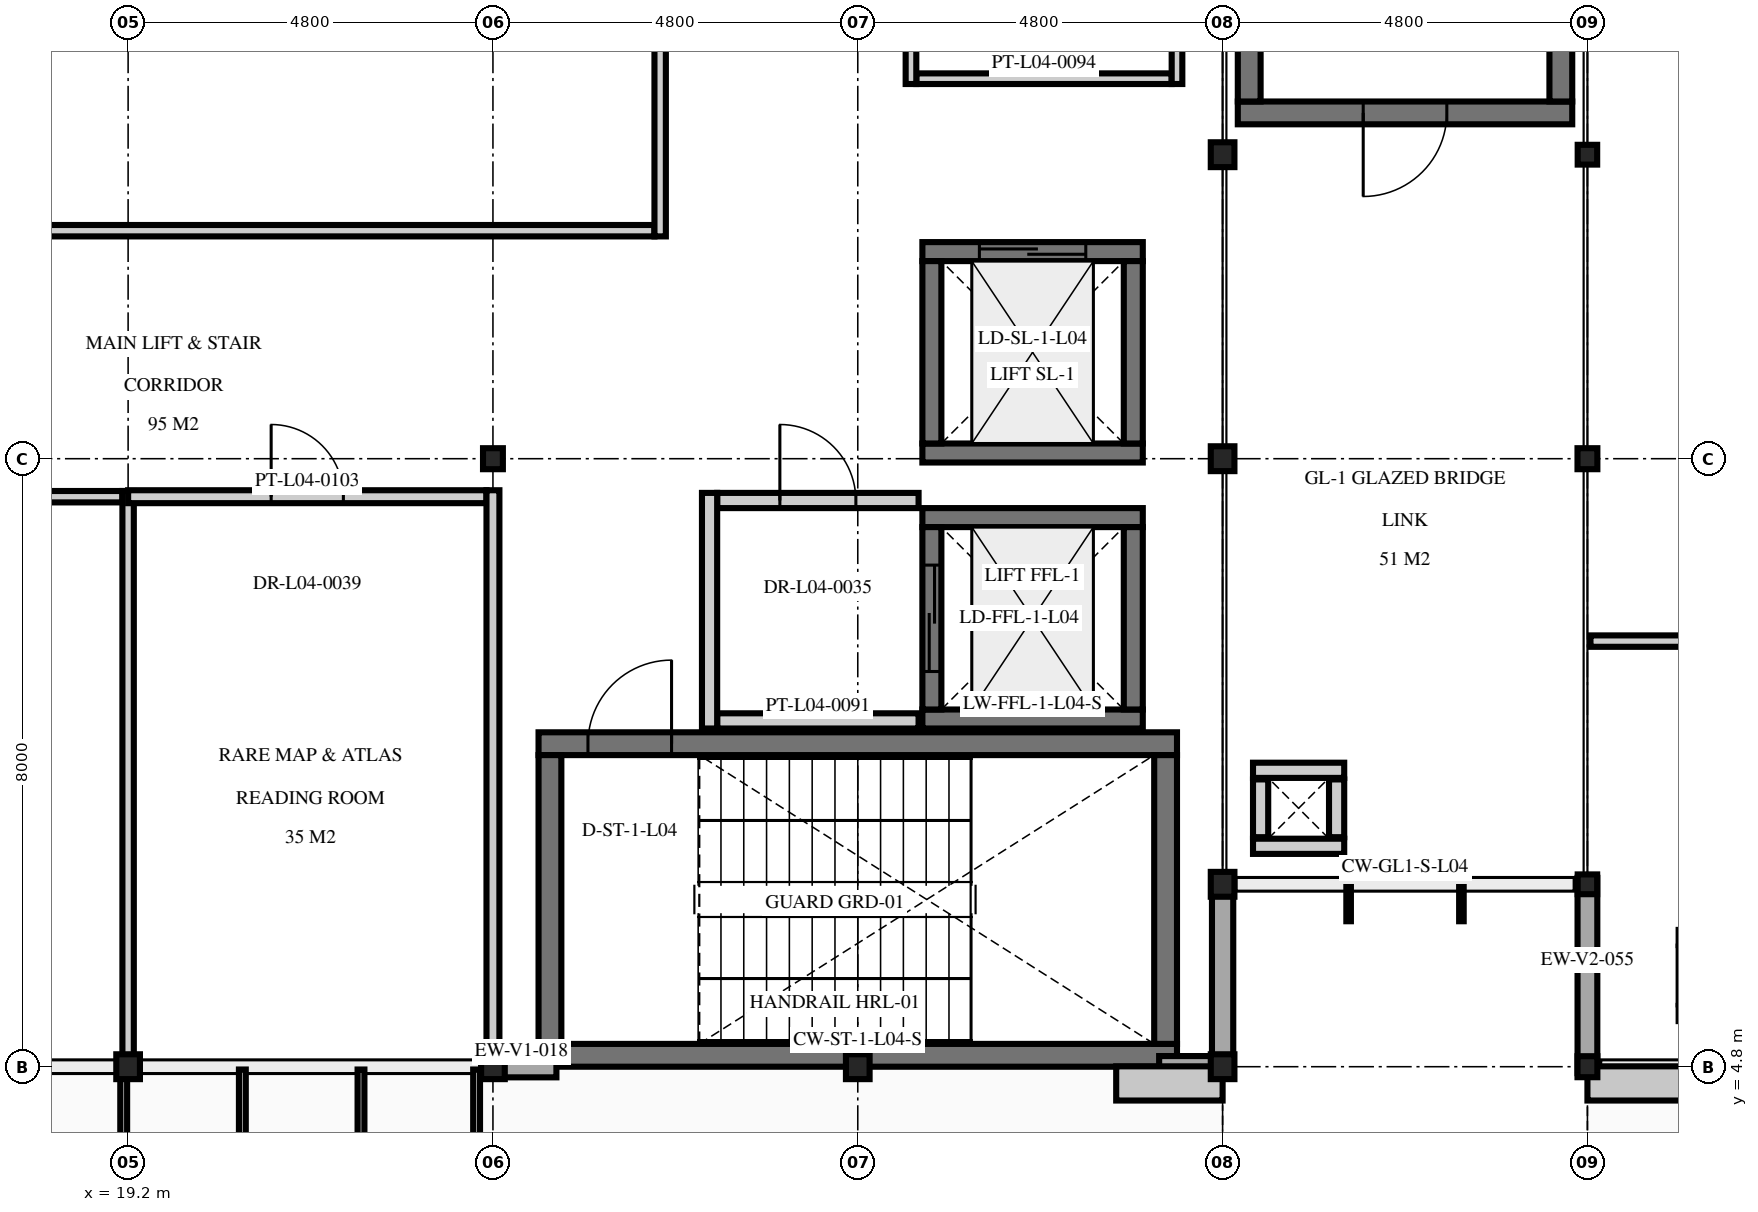
"""IFC4 building model, lengths in metres.
Left out: names, types, materials, properties, quantities, classifications, styles, units other than length and angle.
Written with IfcOpenShell. Run it as: python <this file> out.ifc"""

import sys

from ifc_helpers import new_model, si_unit, direction, frame, frame_2d, origin, origin_2d, place, context, subcontext, project, spatial, rectangle, i_section, extrude, element, fill, save


model = new_model("IFC4")
c1 = context("Model", 3, precision=1e-05, world=origin(), true_north=direction((0.0, 1.0)))
c2 = subcontext(c1, "Body", "Model", "MODEL_VIEW")
j1 = project(units=[si_unit("LENGTHUNIT", "METRE"), si_unit("PLANEANGLEUNIT", "RADIAN")], contexts=[c1])
p1 = place(None, origin())
s1 = spatial("IfcSite", under=j1, at=p1, CompositionType="ELEMENT")
p2 = place(p1, origin())
s2 = spatial("IfcBuilding", under=s1, at=p2, CompositionType="ELEMENT")
p3 = place(p2, frame((0.0, 0.0, 18.6)))
s3 = spatial("IfcBuildingStorey", under=s2, at=p3, CompositionType="ELEMENT", Elevation=18.6)
for number, where, z_axis, x_axis in (
    (1, (19.2, 4.8, 0.0), (0.0, 0.0, 1.0), (1.0, 0.0, 0.0)),
    (2, (24.0, 4.8, 0.0), (0.0, 0.0, 1.0), (1.0, 0.0, 0.0)),
    (3, (28.8, 4.8, 0.0), (0.0, 0.0, 1.0), (1.0, 0.0, 0.0)),
    (4, (33.6, 4.8, 0.0), (0.0, 0.0, 1.0), (1.0, 0.0, 0.0)),
    (5, (33.6, 7.2, 0.0), (0.0, 0.0, 1.0), (1.0, 0.0, 0.0)),
    (6, (33.6, 12.8, 0.0), (0.0, 0.0, 1.0), (1.0, 0.0, 0.0)),
    (7, (33.6, 16.8, 0.0), (0.0, 0.0, 1.0), (1.0, 0.0, 0.0)),
):
    element("IfcColumn", number, at=place(p3, frame(where, z_axis=z_axis, x_axis=x_axis)), inside=s3, PredefinedType="COLUMN", context=c2, shape_type="SweptSolid", body=[
        extrude(i_section(OverallWidth=0.311, OverallDepth=0.327, WebThickness=0.016, FlangeThickness=0.025, at=origin_2d()), origin(), (0.0, 0.0, 1.0), 4.5),
    ])
for number, where, z_axis, x_axis in (
    (8, (24.0, 12.8, 0.0), (0.0, 0.0, 1.0), (1.0, 0.0, 0.0)),
    (9, (38.4, 4.8, 0.0), (0.0, 0.0, 1.0), (1.0, 0.0, 0.0)),
    (10, (38.4, 12.8, 0.0), (0.0, 0.0, 1.0), (1.0, 0.0, 0.0)),
):
    element("IfcColumn", number, at=place(p3, frame(where, z_axis=z_axis, x_axis=x_axis)), inside=s3, PredefinedType="COLUMN", context=c2, shape_type="SweptSolid", body=[
        extrude(i_section(OverallWidth=0.261, OverallDepth=0.276, WebThickness=0.015, FlangeThickness=0.025, at=origin_2d()), origin(), (0.0, 0.0, 1.0), 4.5),
    ])
for number, where, z_axis, x_axis in (
    (11, (38.4, 7.2, 0.0), (0.0, 0.0, 1.0), (1.0, 0.0, 0.0)),
    (12, (38.4, 16.8, 0.0), (0.0, 0.0, 1.0), (1.0, 0.0, 0.0)),
):
    element("IfcColumn", number, at=place(p3, frame(where, z_axis=z_axis, x_axis=x_axis)), inside=s3, PredefinedType="COLUMN", context=c2, shape_type="SweptSolid", body=[
        extrude(i_section(OverallWidth=0.256, OverallDepth=0.26, WebThickness=0.01, FlangeThickness=0.017, at=origin_2d()), origin(), (0.0, 0.0, 1.0), 4.5),
    ])
p4 = place(p3, frame((33.0, 4.95, 0.0), z_axis=(0.0, 0.0, 1.0), x_axis=(-1.0, 0.0, 0.0)))
e13 = element("IfcWall", 13, at=p4, inside=s3, PredefinedType="SHEAR", context=c2, shape_type="SweptSolid", body=[
    extrude(rectangle(XDim=8.4, YDim=0.3, at=frame_2d((4.2, 0.0))), origin(), (0.0, 0.0, 1.0), 4.28),
])
p5 = place(p3, frame((24.6, 9.05, 0.0), z_axis=(0.0, 0.0, 1.0), x_axis=(1.0, 0.0, 0.0)))
e14 = element("IfcWall", 14, at=p5, inside=s3, PredefinedType="SHEAR", context=c2, shape_type="SweptSolid", body=[
    extrude(rectangle(XDim=8.4, YDim=0.3, at=frame_2d((4.2, 0.0))), origin(), (0.0, 0.0, 1.0), 4.28),
])
p6 = place(p5, frame((0.65, 0.0, 0.0)))
e15 = element("IfcOpeningElement", 15, at=p6, cuts=e14, PredefinedType="OPENING", context=c2, shape_type="SweptSolid", body=[
    extrude(rectangle(XDim=1.1, YDim=2.2, at=frame_2d((0.55, 1.1))), frame((0.0, 0.16, 0.0), z_axis=(0.0, -1.0, 0.0), x_axis=(1.0, 0.0, 0.0)), (0.0, 0.0, 1.0), 0.32),
])
for number, where, z_axis, x_axis in (
    (16, (24.75, 5.1, 0.0), (0.0, 0.0, 1.0), (0.0, 1.0, 0.0)),
    (17, (32.85, 8.9, 0.0), (0.0, 0.0, 1.0), (0.0, -1.0, 0.0)),
):
    element("IfcWall", number, at=place(p3, frame(where, z_axis=z_axis, x_axis=x_axis)), inside=s3, PredefinedType="SHEAR", context=c2, shape_type="SweptSolid", body=[
        extrude(rectangle(XDim=3.8, YDim=0.3, at=frame_2d((1.9, 0.0))), origin(), (0.0, 0.0, 1.0), 4.28),
    ])
p7 = place(p3, frame((38.2, 17.35, 0.0), z_axis=(0.0, 0.0, 1.0), x_axis=(-1.0, 0.0, 0.0)))
e18 = element("IfcWall", 18, at=p7, inside=s3, PredefinedType="SHEAR", context=c2, shape_type="SweptSolid", body=[
    extrude(rectangle(XDim=4.4, YDim=0.3, at=frame_2d((2.2, 0.0))), origin(), (0.0, 0.0, 1.0), 4.28),
])
p8 = place(p7, frame((1.65, 0.0, 0.0)))
e19 = element("IfcOpeningElement", 19, at=p8, cuts=e18, PredefinedType="OPENING", context=c2, shape_type="SweptSolid", body=[
    extrude(rectangle(XDim=1.1, YDim=2.2, at=frame_2d((0.55, 1.1))), frame((0.0, 0.16, 0.0), z_axis=(0.0, -1.0, 0.0), x_axis=(1.0, 0.0, 0.0)), (0.0, 0.0, 1.0), 0.32),
])
for number, where, z_axis, x_axis in (
    (20, (33.95, 17.5, 0.0), (0.0, 0.0, 1.0), (0.0, 1.0, 0.0)),
    (21, (38.05, 25.3, 0.0), (0.0, 0.0, 1.0), (0.0, -1.0, 0.0)),
):
    element("IfcWall", number, at=place(p3, frame(where, z_axis=z_axis, x_axis=x_axis)), inside=s3, PredefinedType="SHEAR", context=c2, shape_type="SweptSolid", body=[
        extrude(rectangle(XDim=7.8, YDim=0.3, at=frame_2d((3.9, 0.0))), origin(), (0.0, 0.0, 1.0), 4.28),
    ])
for number, where, z_axis, x_axis in (
    (22, (32.55, 9.375, 0.0), (0.0, 0.0, 1.0), (-1.0, 0.0, 0.0)),
    (23, (29.65, 12.025, 0.0), (0.0, 0.0, 1.0), (1.0, 0.0, 0.0)),
):
    element("IfcWall", number, at=place(p3, frame(where, z_axis=z_axis, x_axis=x_axis)), inside=s3, PredefinedType="SHEAR", context=c2, shape_type="SweptSolid", body=[
        extrude(rectangle(XDim=2.9, YDim=0.25, at=frame_2d((1.45, 0.0))), origin(), (0.0, 0.0, 1.0), 4.28),
    ])
p9 = place(p3, frame((29.775, 9.5, 0.0), z_axis=(0.0, 0.0, 1.0), x_axis=(0.0, 1.0, 0.0)))
e24 = element("IfcWall", 24, at=p9, inside=s3, PredefinedType="SHEAR", context=c2, shape_type="SweptSolid", body=[
    extrude(rectangle(XDim=2.4, YDim=0.25, at=frame_2d((1.2, 0.0))), origin(), (0.0, 0.0, 1.0), 4.28),
])
p10 = place(p9, frame((0.5, 0.0, 0.0)))
e25 = element("IfcOpeningElement", 25, at=p10, cuts=e24, PredefinedType="OPENING", context=c2, shape_type="SweptSolid", body=[
    extrude(rectangle(XDim=1.4, YDim=2.2, at=frame_2d((0.7, 1.1))), frame((0.0, 0.135, 0.0), z_axis=(0.0, -1.0, 0.0), x_axis=(1.0, 0.0, 0.0)), (0.0, 0.0, 1.0), 0.27),
])
p11 = place(p3, frame((32.425, 11.9, 0.0), z_axis=(0.0, 0.0, 1.0), x_axis=(0.0, -1.0, 0.0)))
e26 = element("IfcWall", 26, at=p11, inside=s3, PredefinedType="SHEAR", context=c2, shape_type="SweptSolid", body=[
    extrude(rectangle(XDim=2.4, YDim=0.25, at=frame_2d((1.2, 0.0))), origin(), (0.0, 0.0, 1.0), 4.28),
])
p12 = place(p3, frame((32.55, 12.875, 0.0), z_axis=(0.0, 0.0, 1.0), x_axis=(-1.0, 0.0, 0.0)))
e27 = element("IfcWall", 27, at=p12, inside=s3, PredefinedType="SHEAR", context=c2, shape_type="SweptSolid", body=[
    extrude(rectangle(XDim=2.9, YDim=0.25, at=frame_2d((1.45, 0.0))), origin(), (0.0, 0.0, 1.0), 4.28),
])
p13 = place(p3, frame((29.65, 15.525, 0.0), z_axis=(0.0, 0.0, 1.0), x_axis=(1.0, 0.0, 0.0)))
e28 = element("IfcWall", 28, at=p13, inside=s3, PredefinedType="SHEAR", context=c2, shape_type="SweptSolid", body=[
    extrude(rectangle(XDim=2.9, YDim=0.25, at=frame_2d((1.45, 0.0))), origin(), (0.0, 0.0, 1.0), 4.28),
])
p14 = place(p13, frame((0.75, 0.0, 0.0)))
e29 = element("IfcOpeningElement", 29, at=p14, cuts=e28, PredefinedType="OPENING", context=c2, shape_type="SweptSolid", body=[
    extrude(rectangle(XDim=1.4, YDim=2.2, at=frame_2d((0.7, 1.1))), frame((0.0, 0.135, 0.0), z_axis=(0.0, -1.0, 0.0), x_axis=(1.0, 0.0, 0.0)), (0.0, 0.0, 1.0), 0.27),
])
for number, where, z_axis, x_axis in (
    (30, (29.775, 13.0, 0.0), (0.0, 0.0, 1.0), (0.0, 1.0, 0.0)),
    (31, (32.425, 15.4, 0.0), (0.0, 0.0, 1.0), (0.0, -1.0, 0.0)),
):
    element("IfcWall", number, at=place(p3, frame(where, z_axis=z_axis, x_axis=x_axis)), inside=s3, PredefinedType="SHEAR", context=c2, shape_type="SweptSolid", body=[
        extrude(rectangle(XDim=2.4, YDim=0.25, at=frame_2d((1.2, 0.0))), origin(), (0.0, 0.0, 1.0), 4.28),
    ])
p15 = place(p3, frame((40.8, 5.5, 0.0), z_axis=(0.0, 0.0, 1.0), x_axis=(-1.0, 0.0, 0.0)))
e32 = element("IfcWall", 32, at=p15, inside=s3, PredefinedType="PARTITIONING", context=c2, shape_type="SweptSolid", body=[
    extrude(rectangle(XDim=1.2, YDim=0.2, at=frame_2d((0.6, 0.0))), origin(), (0.0, 0.0, 1.0), 3.78),
])
p16 = place(p3, frame((39.7, 5.62, 0.0), z_axis=(0.0, 0.0, 1.0), x_axis=(0.0, 1.0, 0.0)))
e33 = element("IfcWall", 33, at=p16, inside=s3, PredefinedType="PARTITIONING", context=c2, shape_type="SweptSolid", body=[
    extrude(rectangle(XDim=0.76, YDim=0.2, at=frame_2d((0.38, 0.0))), origin(), (0.0, 0.0, 1.0), 3.78),
])
for number, where, z_axis, x_axis in (
    (34, (35.2, 7.7, 0.0), (0.0, 0.0, 1.0), (-1.0, 0.0, 0.0)),
    (35, (34.0, 8.7, 0.0), (0.0, 0.0, 1.0), (1.0, 0.0, 0.0)),
):
    element("IfcWall", number, at=place(p3, frame(where, z_axis=z_axis, x_axis=x_axis)), inside=s3, PredefinedType="PARTITIONING", context=c2, shape_type="SweptSolid", body=[
        extrude(rectangle(XDim=1.2, YDim=0.2, at=frame_2d((0.6, 0.0))), origin(), (0.0, 0.0, 1.0), 3.78),
    ])
for number, where, z_axis, x_axis in (
    (36, (34.1, 7.82, 0.0), (0.0, 0.0, 1.0), (0.0, 1.0, 0.0)),
    (37, (35.1, 8.58, 0.0), (0.0, 0.0, 1.0), (0.0, -1.0, 0.0)),
):
    element("IfcWall", number, at=place(p3, frame(where, z_axis=z_axis, x_axis=x_axis)), inside=s3, PredefinedType="PARTITIONING", context=c2, shape_type="SweptSolid", body=[
        extrude(rectangle(XDim=0.76, YDim=0.2, at=frame_2d((0.38, 0.0))), origin(), (0.0, 0.0, 1.0), 3.78),
    ])
p17 = place(p3, frame((24.835, 4.8, 0.0), z_axis=(0.0, 0.0, 1.0), x_axis=(-1.0, 0.0, 0.0)))
e38 = element("IfcWall", 38, at=p17, inside=s3, PredefinedType="SOLIDWALL", context=c2, shape_type="SweptSolid", body=[
    extrude(rectangle(XDim=0.92, YDim=0.28, at=frame_2d((0.46, 0.0))), origin(), (0.0, 0.0, 1.0), 3.665),
])
p18 = place(p3, frame((33.685, 4.8, 0.0), z_axis=(0.0, 0.0, 1.0), x_axis=(-1.0, 0.0, 0.0)))
e39 = element("IfcWall", 39, at=p18, inside=s3, PredefinedType="SOLIDWALL", context=c2, shape_type="SweptSolid", body=[
    extrude(rectangle(XDim=0.92, YDim=0.28, at=frame_2d((0.46, 0.0))), origin(), (0.0, 0.0, 1.0), 3.665),
])
p19 = place(p3, frame((33.6, 7.285, 0.0), z_axis=(0.0, 0.0, 1.0), x_axis=(0.0, -1.0, 0.0)))
e40 = element("IfcWall", 40, at=p19, inside=s3, PredefinedType="SOLIDWALL", context=c2, shape_type="SweptSolid", body=[
    extrude(rectangle(XDim=2.57, YDim=0.28, at=frame_2d((1.285, 0.0))), origin(), (0.0, 0.0, 1.0), 3.665),
])
p20 = place(p3, frame((38.4, 4.715, 0.0), z_axis=(0.0, 0.0, 1.0), x_axis=(0.0, 1.0, 0.0)))
e41 = element("IfcWall", 41, at=p20, inside=s3, PredefinedType="SOLIDWALL", context=c2, shape_type="SweptSolid", body=[
    extrude(rectangle(XDim=2.57, YDim=0.26, at=frame_2d((1.285, 0.0))), origin(), (0.0, 0.0, 1.0), 3.855),
])
p21 = place(p3, frame((26.95, 9.35, 0.0), z_axis=(0.0, 0.0, 1.0), x_axis=(1.0, 0.0, 0.0)))
e42 = element("IfcWall", 42, at=p21, inside=s3, PredefinedType="PARTITIONING", context=c2, shape_type="SweptSolid", body=[
    extrude(rectangle(XDim=2.65, YDim=0.2, at=frame_2d((1.325, 0.0))), origin(), (0.0, 0.0, 1.0), 4.28),
])
p22 = place(p3, frame((26.95, 12.25, 0.0), z_axis=(0.0, 0.0, 1.0), x_axis=(1.0, 0.0, 0.0)))
e43 = element("IfcWall", 43, at=p22, inside=s3, PredefinedType="PARTITIONING", context=c2, shape_type="SweptSolid", body=[
    extrude(rectangle(XDim=2.65, YDim=0.2, at=frame_2d((1.325, 0.0))), origin(), (0.0, 0.0, 1.0), 4.28),
])
p23 = place(p22, frame((0.825, 0.0, 0.0)))
e44 = element("IfcOpeningElement", 44, at=p23, cuts=e43, PredefinedType="OPENING", context=c2, shape_type="SweptSolid", body=[
    extrude(rectangle(XDim=1.0, YDim=2.2, at=frame_2d((0.5, 1.1))), frame((0.0, 0.11, 0.0), z_axis=(0.0, -1.0, 0.0), x_axis=(1.0, 0.0, 0.0)), (0.0, 0.0, 1.0), 0.22),
])
p24 = place(p3, frame((26.85, 9.25, 0.0), z_axis=(0.0, 0.0, 1.0), x_axis=(0.0, 1.0, 0.0)))
e45 = element("IfcWall", 45, at=p24, inside=s3, PredefinedType="PARTITIONING", context=c2, shape_type="SweptSolid", body=[
    extrude(rectangle(XDim=3.1, YDim=0.2, at=frame_2d((1.55, 0.0))), origin(), (0.0, 0.0, 1.0), 4.28),
])
p25 = place(p3, frame((29.57, 17.8, 0.0), z_axis=(0.0, 0.0, 1.0), x_axis=(1.0, 0.0, 0.0)))
e46 = element("IfcWall", 46, at=p25, inside=s3, PredefinedType="PARTITIONING", context=c2, shape_type="SweptSolid", body=[
    extrude(rectangle(XDim=3.36, YDim=0.14, at=frame_2d((1.68, 0.0))), origin(), (0.0, 0.0, 1.0), 4.015),
])
p26 = place(p3, frame((29.5, 17.73, 0.0), z_axis=(0.0, 0.0, 1.0), x_axis=(0.0, 1.0, 0.0)))
e47 = element("IfcWall", 47, at=p26, inside=s3, PredefinedType="PARTITIONING", context=c2, shape_type="SweptSolid", body=[
    extrude(rectangle(XDim=4.24, YDim=0.14, at=frame_2d((2.12, 0.0))), origin(), (0.0, 0.0, 1.0), 3.665),
])
p27 = place(p26, frame((1.645, 0.0, 0.0)))
e48 = element("IfcOpeningElement", 48, at=p27, cuts=e47, PredefinedType="OPENING", context=c2, shape_type="SweptSolid", body=[
    extrude(rectangle(XDim=0.95, YDim=2.1, at=frame_2d((0.475, 1.05))), frame((0.0, 0.08, 0.0), z_axis=(0.0, -1.0, 0.0), x_axis=(1.0, 0.0, 0.0)), (0.0, 0.0, 1.0), 0.16),
])
p28 = place(p3, frame((33.0, 17.73, 0.0), z_axis=(0.0, 0.0, 1.0), x_axis=(0.0, 1.0, 0.0)))
e49 = element("IfcWall", 49, at=p28, inside=s3, PredefinedType="PARTITIONING", context=c2, shape_type="SweptSolid", body=[
    extrude(rectangle(XDim=4.24, YDim=0.14, at=frame_2d((2.12, 0.0))), origin(), (0.0, 0.0, 1.0), 3.665),
])
p29 = place(p3, frame((0.04, 12.3, 0.0), z_axis=(0.0, 0.0, 1.0), x_axis=(1.0, 0.0, 0.0)))
e50 = element("IfcWall", 50, at=p29, inside=s3, PredefinedType="PARTITIONING", context=c2, shape_type="SweptSolid", body=[
    extrude(rectangle(XDim=19.085, YDim=0.15, at=frame_2d((9.542, 0.0))), origin(), (0.0, 0.0, 1.0), 3.711),
])
p30 = place(p29, frame((10.818, 0.0, 0.0)))
e51 = element("IfcOpeningElement", 51, at=p30, cuts=e50, PredefinedType="OPENING", context=c2, shape_type="SweptSolid", body=[
    extrude(rectangle(XDim=0.95, YDim=2.15, at=frame_2d((0.475, 1.075))), frame((0.0, 0.085, 0.0), z_axis=(0.0, -1.0, 0.0), x_axis=(1.0, 0.0, 0.0)), (0.0, 0.0, 1.0), 0.17),
])
p31 = place(p3, frame((19.2, 4.84, 0.0), z_axis=(0.0, 0.0, 1.0), x_axis=(0.0, 1.0, 0.0)))
e52 = element("IfcWall", 52, at=p31, inside=s3, PredefinedType="PARTITIONING", context=c2, shape_type="SweptSolid", body=[
    extrude(rectangle(XDim=7.535, YDim=0.15, at=frame_2d((3.768, 0.0))), origin(), (0.0, 0.0, 1.0), 3.665),
])
p32 = place(p3, frame((19.2, 12.3, 0.0), z_axis=(0.0, 0.0, 1.0), x_axis=(1.0, 0.0, 0.0)))
e53 = element("IfcWall", 53, at=p32, inside=s3, PredefinedType="PARTITIONING", context=c2, shape_type="SweptSolid", body=[
    extrude(rectangle(XDim=4.715, YDim=0.17, at=frame_2d((2.357, 0.0))), origin(), (0.0, 0.0, 1.0), 3.711),
])
p33 = place(p32, frame((1.882, 0.0, 0.0)))
e54 = element("IfcOpeningElement", 54, at=p33, cuts=e53, PredefinedType="OPENING", context=c2, shape_type="SweptSolid", body=[
    extrude(rectangle(XDim=0.95, YDim=2.15, at=frame_2d((0.475, 1.075))), frame((0.0, 0.095, 0.0), z_axis=(0.0, -1.0, 0.0), x_axis=(1.0, 0.0, 0.0)), (0.0, 0.0, 1.0), 0.19),
])
p34 = place(p3, frame((24.0, 4.84, 0.0), z_axis=(0.0, 0.0, 1.0), x_axis=(0.0, 1.0, 0.0)))
e55 = element("IfcWall", 55, at=p34, inside=s3, PredefinedType="PARTITIONING", context=c2, shape_type="SweptSolid", body=[
    extrude(rectangle(XDim=7.545, YDim=0.17, at=frame_2d((3.772, 0.0))), origin(), (0.0, 0.0, 1.0), 3.665),
])
p35 = place(p3, frame((9.675, 15.8, 0.0), z_axis=(0.0, 0.0, 1.0), x_axis=(1.0, 0.0, 0.0)))
e56 = element("IfcWall", 56, at=p35, inside=s3, PredefinedType="PARTITIONING", context=c2, shape_type="SweptSolid", body=[
    extrude(rectangle(XDim=16.45, YDim=0.15, at=frame_2d((8.225, 0.0))), origin(), (0.0, 0.0, 1.0), 3.711),
])
p36 = place(p3, frame((26.2, 15.725, 0.0), z_axis=(0.0, 0.0, 1.0), x_axis=(0.0, 1.0, 0.0)))
e57 = element("IfcWall", 57, at=p36, inside=s3, PredefinedType="PARTITIONING", context=c2, shape_type="SweptSolid", body=[
    extrude(rectangle(XDim=21.035, YDim=0.15, at=frame_2d((10.518, 0.0))), origin(), (0.0, 0.0, 1.0), 3.665),
])
p37 = place(p3, frame((38.44, 10.4, 0.0), z_axis=(0.0, 0.0, 1.0), x_axis=(1.0, 0.0, 0.0)))
e58 = element("IfcWall", 58, at=p37, inside=s3, PredefinedType="PARTITIONING", context=c2, shape_type="SweptSolid", body=[
    extrude(rectangle(XDim=9.485, YDim=0.15, at=frame_2d((4.743, 0.0))), origin(), (0.0, 0.0, 1.0), 3.925),
])
p38 = place(p37, frame((4.268, 0.0, 0.0)))
e59 = element("IfcOpeningElement", 59, at=p38, cuts=e58, PredefinedType="OPENING", context=c2, shape_type="SweptSolid", body=[
    extrude(rectangle(XDim=0.95, YDim=2.15, at=frame_2d((0.475, 1.075))), frame((0.0, 0.085, 0.0), z_axis=(0.0, -1.0, 0.0), x_axis=(1.0, 0.0, 0.0)), (0.0, 0.0, 1.0), 0.17),
])
p39 = place(p6, origin())
e60 = element("IfcDoor", 60, at=p39, inside=s3, OperationType="SINGLE_SWING_RIGHT", PredefinedType="DOOR", context=c2, shape_type="SweptSolid", body=[
    extrude(rectangle(XDim=1.1, YDim=2.2, at=frame_2d((0.55, 1.1))), frame((0.0, 0.025, 0.0), z_axis=(0.0, -1.0, 0.0), x_axis=(1.0, 0.0, 0.0)), (0.0, 0.0, 1.0), 0.05),
])
fill(e15, e60)
p40 = place(p8, origin())
e61 = element("IfcDoor", 61, at=p40, inside=s3, OperationType="SINGLE_SWING_RIGHT", PredefinedType="DOOR", context=c2, shape_type="SweptSolid", body=[
    extrude(rectangle(XDim=1.1, YDim=2.2, at=frame_2d((0.55, 1.1))), frame((0.0, 0.025, 0.0), z_axis=(0.0, -1.0, 0.0), x_axis=(1.0, 0.0, 0.0)), (0.0, 0.0, 1.0), 0.05),
])
fill(e19, e61)
p41 = place(p10, origin())
e62 = element("IfcDoor", 62, at=p41, inside=s3, OperationType="DOUBLE_DOOR_SLIDING", PredefinedType="DOOR", context=c2, shape_type="SweptSolid", body=[
    extrude(rectangle(XDim=1.4, YDim=2.2, at=frame_2d((0.7, 1.1))), frame((0.0, 0.025, 0.0), z_axis=(0.0, -1.0, 0.0), x_axis=(1.0, 0.0, 0.0)), (0.0, 0.0, 1.0), 0.05),
])
fill(e25, e62)
p42 = place(p14, origin())
e63 = element("IfcDoor", 63, at=p42, inside=s3, OperationType="DOUBLE_DOOR_SLIDING", PredefinedType="DOOR", context=c2, shape_type="SweptSolid", body=[
    extrude(rectangle(XDim=1.4, YDim=2.2, at=frame_2d((0.7, 1.1))), frame((0.0, 0.025, 0.0), z_axis=(0.0, -1.0, 0.0), x_axis=(1.0, 0.0, 0.0)), (0.0, 0.0, 1.0), 0.05),
])
fill(e29, e63)
p43 = place(p23, origin())
e64 = element("IfcDoor", 64, at=p43, inside=s3, OperationType="SINGLE_SWING_LEFT", PredefinedType="DOOR", context=c2, shape_type="SweptSolid", body=[
    extrude(rectangle(XDim=1.0, YDim=2.2, at=frame_2d((0.5, 1.1))), frame((0.0, 0.025, 0.0), z_axis=(0.0, -1.0, 0.0), x_axis=(1.0, 0.0, 0.0)), (0.0, 0.0, 1.0), 0.05),
])
fill(e44, e64)
p44 = place(p33, origin())
e65 = element("IfcDoor", 65, at=p44, inside=s3, OperationType="SINGLE_SWING_LEFT", PredefinedType="DOOR", context=c2, shape_type="SweptSolid", body=[
    extrude(rectangle(XDim=0.95, YDim=2.15, at=frame_2d((0.475, 1.075))), frame((0.0, 0.025, 0.0), z_axis=(0.0, -1.0, 0.0), x_axis=(1.0, 0.0, 0.0)), (0.0, 0.0, 1.0), 0.05),
])
fill(e54, e65)
save(model, sys.argv[1])
